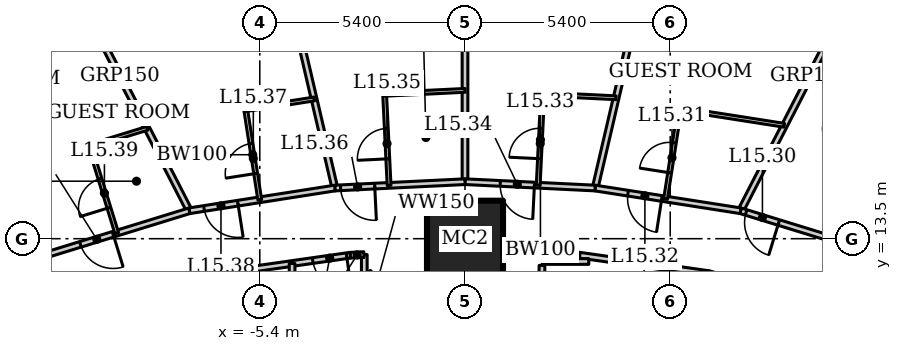
"""IFC4 building model, lengths in metres.
Left out: names, types, materials, properties, quantities, classifications, styles, units other than length and angle.
Written with IfcOpenShell. Run it as: python <this file> out.ifc"""

import sys

from ifc_helpers import new_model, si_unit, direction, frame, frame_2d, origin, origin_2d, place, context, subcontext, project, spatial, rectangle, hollow_rectangle, extrude, element, fill, save


model = new_model("IFC4")
c1 = context("Model", 3, precision=1e-05, world=origin(), true_north=direction((0.0, 1.0)))
c2 = subcontext(c1, "Body", "Model", "MODEL_VIEW")
j1 = project(units=[si_unit("LENGTHUNIT", "METRE"), si_unit("PLANEANGLEUNIT", "RADIAN")], contexts=[c1])
p1 = place(None, origin())
s1 = spatial("IfcSite", under=j1, at=p1, CompositionType="ELEMENT")
p2 = place(p1, origin())
s2 = spatial("IfcBuilding", under=s1, at=p2, CompositionType="ELEMENT")
p3 = place(p2, frame((0.0, 0.0, 69.4)))
s3 = spatial("IfcBuildingStorey", under=s2, at=p3, CompositionType="ELEMENT", Elevation=69.4)
p4 = place(p3, frame((0.0, 13.5, 0.0), z_axis=(0.0, 0.0, 1.0), x_axis=(1.0, 0.0, 0.0)))
e1 = element("IfcColumn", 1, at=p4, inside=s3, PredefinedType="COLUMN", context=c2, shape_type="SweptSolid", body=[
    extrude(hollow_rectangle(XDim=2.0, YDim=2.0, WallThickness=0.17, at=origin_2d()), origin(), (0.0, 0.0, 1.0), 3.6),
])
p5 = place(p3, frame((10.912, 21.346, 0.0), z_axis=(0.0, 0.0, 1.0), x_axis=(-0.45752665959, -0.889195904042, 0.0)))
e2 = element("IfcWall", 2, at=p5, inside=s3, PredefinedType="PARTITIONING", context=c2, shape_type="SweptSolid", body=[
    extrude(rectangle(XDim=7.997, YDim=0.15, at=frame_2d((3.999, 0.0))), origin(), (0.0, 0.0, 1.0), 2.528),
])
p6 = place(p3, frame((5.211, 22.496, 0.0), z_axis=(0.0, 0.0, 1.0), x_axis=(-0.227056984461, -0.973881474209, 0.0)))
e3 = element("IfcWall", 3, at=p6, inside=s3, PredefinedType="PARTITIONING", context=c2, shape_type="SweptSolid", body=[
    extrude(rectangle(XDim=7.869, YDim=0.15, at=frame_2d((3.934, 0.0))), origin(), (0.0, 0.0, 1.0), 2.767),
])
p7 = place(p3, frame((0.0, 22.825, 0.0), z_axis=(0.0, 0.0, 1.0), x_axis=(0.0, -1.0, 0.0)))
e4 = element("IfcWall", 4, at=p7, inside=s3, PredefinedType="PARTITIONING", context=c2, shape_type="SweptSolid", body=[
    extrude(rectangle(XDim=7.825, YDim=0.15, at=frame_2d((3.912, 0.0))), origin(), (0.0, 0.0, 1.0), 2.924),
])
p8 = place(p3, frame((-5.211, 22.496, 0.0), z_axis=(0.0, 0.0, 1.0), x_axis=(0.227056984461, -0.973881474209, 0.0)))
e5 = element("IfcWall", 5, at=p8, inside=s3, PredefinedType="PARTITIONING", context=c2, shape_type="SweptSolid", body=[
    extrude(rectangle(XDim=7.869, YDim=0.15, at=frame_2d((3.934, 0.0))), origin(), (0.0, 0.0, 1.0), 2.767),
])
p9 = place(p3, frame((-10.912, 21.346, 0.0), z_axis=(0.0, 0.0, 1.0), x_axis=(0.45752665959, -0.889195904042, 0.0)))
e6 = element("IfcWall", 6, at=p9, inside=s3, PredefinedType="PARTITIONING", context=c2, shape_type="SweptSolid", body=[
    extrude(rectangle(XDim=7.997, YDim=0.15, at=frame_2d((3.999, 0.0))), origin(), (0.0, 0.0, 1.0), 2.528),
])
p10 = place(p3, frame((12.257, 12.693, 0.0), z_axis=(0.0, 0.0, 1.0), x_axis=(-0.955657956744, 0.294478980085, 0.0)))
e7 = element("IfcWall", 7, at=p10, inside=s3, PredefinedType="PARTITIONING", context=c2, shape_type="SweptSolid", body=[
    extrude(rectangle(XDim=5.236, YDim=0.15, at=frame_2d((2.618, 0.0))), origin(), (0.0, 0.0, 1.0), 3.45),
])
p11 = place(p10, frame((4.186, 0.0, 0.0)))
e8 = element("IfcOpeningElement", 8, at=p11, cuts=e7, PredefinedType="OPENING", context=c2, shape_type="SweptSolid", body=[
    extrude(rectangle(XDim=0.9, YDim=2.1, at=frame_2d((0.45, 1.05))), frame((0.0, 0.085, 0.0), z_axis=(0.0, -1.0, 0.0), x_axis=(1.0, 0.0, 0.0)), (0.0, 0.0, 1.0), 0.17),
])
p12 = place(p3, frame((7.253, 14.235, 0.0), z_axis=(0.0, 0.0, 1.0), x_axis=(-0.988015036573, 0.154357660987, 0.0)))
e9 = element("IfcWall", 9, at=p12, inside=s3, PredefinedType="PARTITIONING", context=c2, shape_type="SweptSolid", body=[
    extrude(rectangle(XDim=3.875, YDim=0.15, at=frame_2d((1.938, 0.0))), origin(), (0.0, 0.0, 1.0), 3.45),
])
p13 = place(p12, frame((2.1, 0.0, 0.0)))
e10 = element("IfcOpeningElement", 10, at=p13, cuts=e9, PredefinedType="OPENING", context=c2, shape_type="SweptSolid", body=[
    extrude(rectangle(XDim=0.9, YDim=2.1, at=frame_2d((0.45, 1.05))), frame((0.0, 0.085, 0.0), z_axis=(0.0, -1.0, 0.0), x_axis=(1.0, 0.0, 0.0)), (0.0, 0.0, 1.0), 0.17),
])
p14 = place(p3, frame((3.424, 14.833, 0.0), z_axis=(0.0, 0.0, 1.0), x_axis=(-0.998809560203, 0.048779733975, 0.0)))
e11 = element("IfcWall", 11, at=p14, inside=s3, PredefinedType="PARTITIONING", context=c2, shape_type="SweptSolid", body=[
    extrude(rectangle(XDim=3.428, YDim=0.15, at=frame_2d((1.714, 0.0))), origin(), (0.0, 0.0, 1.0), 3.45),
])
p15 = place(p14, frame((1.6, 0.0, 0.0)))
e12 = element("IfcOpeningElement", 12, at=p15, cuts=e11, PredefinedType="OPENING", context=c2, shape_type="SweptSolid", body=[
    extrude(rectangle(XDim=0.9, YDim=2.1, at=frame_2d((0.45, 1.05))), frame((0.0, 0.085, 0.0), z_axis=(0.0, -1.0, 0.0), x_axis=(1.0, 0.0, 0.0)), (0.0, 0.0, 1.0), 0.17),
])
p16 = place(p3, frame((0.0, 15.0, 0.0), z_axis=(0.0, 0.0, 1.0), x_axis=(-0.998809560203, -0.048779733975, 0.0)))
e13 = element("IfcWall", 13, at=p16, inside=s3, PredefinedType="PARTITIONING", context=c2, shape_type="SweptSolid", body=[
    extrude(rectangle(XDim=3.428, YDim=0.15, at=frame_2d((1.714, 0.0))), origin(), (0.0, 0.0, 1.0), 3.45),
])
p17 = place(p16, frame((2.378, 0.0, 0.0)))
e14 = element("IfcOpeningElement", 14, at=p17, cuts=e13, PredefinedType="OPENING", context=c2, shape_type="SweptSolid", body=[
    extrude(rectangle(XDim=0.9, YDim=2.1, at=frame_2d((0.45, 1.05))), frame((0.0, 0.085, 0.0), z_axis=(0.0, -1.0, 0.0), x_axis=(1.0, 0.0, 0.0)), (0.0, 0.0, 1.0), 0.17),
])
p18 = place(p3, frame((-3.424, 14.833, 0.0), z_axis=(0.0, 0.0, 1.0), x_axis=(-0.988015036573, -0.154357660987, 0.0)))
e15 = element("IfcWall", 15, at=p18, inside=s3, PredefinedType="PARTITIONING", context=c2, shape_type="SweptSolid", body=[
    extrude(rectangle(XDim=3.875, YDim=0.15, at=frame_2d((1.938, 0.0))), origin(), (0.0, 0.0, 1.0), 3.45),
])
p19 = place(p18, frame((2.583, 0.0, 0.0)))
e16 = element("IfcOpeningElement", 16, at=p19, cuts=e15, PredefinedType="OPENING", context=c2, shape_type="SweptSolid", body=[
    extrude(rectangle(XDim=0.9, YDim=2.1, at=frame_2d((0.45, 1.05))), frame((0.0, 0.085, 0.0), z_axis=(0.0, -1.0, 0.0), x_axis=(1.0, 0.0, 0.0)), (0.0, 0.0, 1.0), 0.17),
])
p20 = place(p3, frame((-7.253, 14.235, 0.0), z_axis=(0.0, 0.0, 1.0), x_axis=(-0.955657956744, -0.294478980085, 0.0)))
e17 = element("IfcWall", 17, at=p20, inside=s3, PredefinedType="PARTITIONING", context=c2, shape_type="SweptSolid", body=[
    extrude(rectangle(XDim=5.236, YDim=0.15, at=frame_2d((2.618, 0.0))), origin(), (0.0, 0.0, 1.0), 3.45),
])
p21 = place(p20, frame((2.1, 0.0, 0.0)))
e18 = element("IfcOpeningElement", 18, at=p21, cuts=e17, PredefinedType="OPENING", context=c2, shape_type="SweptSolid", body=[
    extrude(rectangle(XDim=0.9, YDim=2.1, at=frame_2d((0.45, 1.05))), frame((0.0, 0.085, 0.0), z_axis=(0.0, -1.0, 0.0), x_axis=(1.0, 0.0, 0.0)), (0.0, 0.0, 1.0), 0.17),
])
p22 = place(p3, frame((10.924, 11.312, 0.0), z_axis=(0.0, 0.0, 1.0), x_axis=(-0.962643729928, 0.270771211967, 0.0)))
e19 = element("IfcWall", 19, at=p22, inside=s3, PredefinedType="PARTITIONING", context=c2, shape_type="SweptSolid", body=[
    extrude(rectangle(XDim=4.688, YDim=0.15, at=frame_2d((2.344, 0.0))), origin(), (0.0, 0.0, 1.0), 3.45),
])
p23 = place(p22, frame((1.894, 0.0, 0.0)))
e20 = element("IfcOpeningElement", 20, at=p23, cuts=e19, PredefinedType="OPENING", context=c2, shape_type="SweptSolid", body=[
    extrude(rectangle(XDim=0.9, YDim=2.1, at=frame_2d((0.45, 1.05))), frame((0.0, 0.085, 0.0), z_axis=(0.0, -1.0, 0.0), x_axis=(1.0, 0.0, 0.0)), (0.0, 0.0, 1.0), 0.17),
])
p24 = place(p3, frame((6.411, 12.582, 0.0), z_axis=(0.0, 0.0, 1.0), x_axis=(-0.990002114939, 0.14105251652, 0.0)))
e21 = element("IfcWall", 21, at=p24, inside=s3, PredefinedType="PARTITIONING", context=c2, shape_type="SweptSolid", body=[
    extrude(rectangle(XDim=3.429, YDim=0.15, at=frame_2d((1.714, 0.0))), origin(), (0.0, 0.0, 1.0), 3.45),
])
p25 = place(p3, frame((-3.016, 13.066, 0.0), z_axis=(0.0, 0.0, 1.0), x_axis=(-0.990002114939, -0.14105251652, 0.0)))
e22 = element("IfcWall", 22, at=p25, inside=s3, PredefinedType="PARTITIONING", context=c2, shape_type="SweptSolid", body=[
    extrude(rectangle(XDim=3.429, YDim=0.15, at=frame_2d((1.714, 0.0))), origin(), (0.0, 0.0, 1.0), 3.45),
])
p26 = place(p25, frame((0.1, 0.0, 0.0)))
e23 = element("IfcOpeningElement", 23, at=p26, cuts=e22, PredefinedType="OPENING", context=c2, shape_type="SweptSolid", body=[
    extrude(rectangle(XDim=0.9, YDim=2.1, at=frame_2d((0.45, 1.05))), frame((0.0, 0.085, 0.0), z_axis=(0.0, -1.0, 0.0), x_axis=(1.0, 0.0, 0.0)), (0.0, 0.0, 1.0), 0.17),
])
p27 = place(p3, frame((-6.411, 12.582, 0.0), z_axis=(0.0, 0.0, 1.0), x_axis=(-0.962643729928, -0.270771211967, 0.0)))
e24 = element("IfcWall", 24, at=p27, inside=s3, PredefinedType="PARTITIONING", context=c2, shape_type="SweptSolid", body=[
    extrude(rectangle(XDim=4.688, YDim=0.15, at=frame_2d((2.344, 0.0))), origin(), (0.0, 0.0, 1.0), 3.45),
])
p28 = place(p27, frame((1.894, 0.0, 0.0)))
e25 = element("IfcOpeningElement", 25, at=p28, cuts=e24, PredefinedType="OPENING", context=c2, shape_type="SweptSolid", body=[
    extrude(rectangle(XDim=0.9, YDim=2.1, at=frame_2d((0.45, 1.05))), frame((0.0, 0.085, 0.0), z_axis=(0.0, -1.0, 0.0), x_axis=(1.0, 0.0, 0.0)), (0.0, 0.0, 1.0), 0.17),
])
p29 = place(p3, frame((-2.65, 9.2, 0.0), z_axis=(0.0, 0.0, 1.0), x_axis=(0.0, 1.0, 0.0)))
e26 = element("IfcWall", 26, at=p29, inside=s3, PredefinedType="SOLIDWALL", context=c2, shape_type="SweptSolid", body=[
    extrude(rectangle(XDim=3.882, YDim=0.15, at=frame_2d((1.941, 0.0))), origin(), (0.0, 0.0, 1.0), 2.767),
])
p30 = place(p3, frame((-4.55, 9.2, 0.0), z_axis=(0.0, 0.0, 1.0), x_axis=(0.0, 1.0, 0.0)))
e27 = element("IfcWall", 27, at=p30, inside=s3, PredefinedType="SOLIDWALL", context=c2, shape_type="SweptSolid", body=[
    extrude(rectangle(XDim=3.647, YDim=0.15, at=frame_2d((1.824, 0.0))), origin(), (0.0, 0.0, 1.0), 3.45),
])
p31 = place(p3, frame((5.277, 14.543, 0.0), z_axis=(0.0, 0.0, 1.0), x_axis=(0.154426532979, 0.988004274238, 0.0)))
e28 = element("IfcWall", 28, at=p31, inside=s3, PredefinedType="PARTITIONING", context=c2, shape_type="SweptSolid", body=[
    extrude(rectangle(XDim=2.4, YDim=0.1, at=frame_2d((1.2, 0.0))), origin(), (0.0, 0.0, 1.0), 3.45),
])
p32 = place(p31, frame((0.7, 0.0, 0.0)))
e29 = element("IfcOpeningElement", 29, at=p32, cuts=e28, PredefinedType="OPENING", context=c2, shape_type="SweptSolid", body=[
    extrude(rectangle(XDim=0.8, YDim=2.1, at=frame_2d((0.4, 1.05))), frame((0.0, 0.06, 0.0), z_axis=(0.0, -1.0, 0.0), x_axis=(1.0, 0.0, 0.0)), (0.0, 0.0, 1.0), 0.12),
])
p33 = place(p3, frame((5.647, 16.915, 0.0), z_axis=(0.0, 0.0, 1.0), x_axis=(0.988015375833, -0.154355489429, 0.0)))
e30 = element("IfcWall", 30, at=p33, inside=s3, PredefinedType="PARTITIONING", context=c2, shape_type="SweptSolid", body=[
    extrude(rectangle(XDim=2.785, YDim=0.1, at=frame_2d((1.393, 0.0))), origin(), (0.0, 0.0, 1.0), 3.45),
])
p34 = place(p3, frame((1.926, 14.906, 0.0), z_axis=(0.0, 0.0, 1.0), x_axis=(0.048725028858, 0.998812230383, 0.0)))
e31 = element("IfcWall", 31, at=p34, inside=s3, PredefinedType="PARTITIONING", context=c2, shape_type="SweptSolid", body=[
    extrude(rectangle(XDim=2.4, YDim=0.1, at=frame_2d((1.2, 0.0))), origin(), (0.0, 0.0, 1.0), 2.749),
])
p35 = place(p34, frame((0.7, 0.0, 0.0)))
e32 = element("IfcOpeningElement", 32, at=p35, cuts=e31, PredefinedType="OPENING", context=c2, shape_type="SweptSolid", body=[
    extrude(rectangle(XDim=0.8, YDim=2.1, at=frame_2d((0.4, 1.05))), frame((0.0, 0.06, 0.0), z_axis=(0.0, -1.0, 0.0), x_axis=(1.0, 0.0, 0.0)), (0.0, 0.0, 1.0), 0.12),
])
p36 = place(p3, frame((2.043, 17.303, 0.0), z_axis=(0.0, 0.0, 1.0), x_axis=(0.998809649749, -0.048777900405, 0.0)))
e33 = element("IfcWall", 33, at=p36, inside=s3, PredefinedType="PARTITIONING", context=c2, shape_type="SweptSolid", body=[
    extrude(rectangle(XDim=1.932, YDim=0.1, at=frame_2d((0.966, 0.0))), origin(), (0.0, 0.0, 1.0), 3.45),
])
p37 = place(p3, frame((-1.998, 14.903, 0.0), z_axis=(0.0, 0.0, 1.0), x_axis=(-0.048831470304, 0.998807032168, 0.0)))
e34 = element("IfcWall", 34, at=p37, inside=s3, PredefinedType="PARTITIONING", context=c2, shape_type="SweptSolid", body=[
    extrude(rectangle(XDim=2.4, YDim=0.1, at=frame_2d((1.2, 0.0))), origin(), (0.0, 0.0, 1.0), 2.749),
])
p38 = place(p37, frame((0.7, 0.0, 0.0)))
e35 = element("IfcOpeningElement", 35, at=p38, cuts=e34, PredefinedType="OPENING", context=c2, shape_type="SweptSolid", body=[
    extrude(rectangle(XDim=0.8, YDim=2.1, at=frame_2d((0.4, 1.05))), frame((0.0, 0.06, 0.0), z_axis=(0.0, -1.0, 0.0), x_axis=(1.0, 0.0, 0.0)), (0.0, 0.0, 1.0), 0.12),
])
p39 = place(p3, frame((-2.115, 17.3, 0.0), z_axis=(0.0, 0.0, 1.0), x_axis=(0.998809749254, 0.048775862842, 0.0)))
e36 = element("IfcWall", 36, at=p39, inside=s3, PredefinedType="PARTITIONING", context=c2, shape_type="SweptSolid", body=[
    extrude(rectangle(XDim=2.117, YDim=0.1, at=frame_2d((1.059, 0.0))), origin(), (0.0, 0.0, 1.0), 3.45),
])
p40 = place(p3, frame((-5.4, 14.524, 0.0), z_axis=(0.0, 0.0, 1.0), x_axis=(-0.154426532979, 0.988004274238, 0.0)))
e37 = element("IfcWall", 37, at=p40, inside=s3, PredefinedType="PARTITIONING", context=c2, shape_type="SweptSolid", body=[
    extrude(rectangle(XDim=2.4, YDim=0.1, at=frame_2d((1.2, 0.0))), origin(), (0.0, 0.0, 1.0), 3.45),
])
p41 = place(p40, frame((0.7, 0.0, 0.0)))
e38 = element("IfcOpeningElement", 38, at=p41, cuts=e37, PredefinedType="OPENING", context=c2, shape_type="SweptSolid", body=[
    extrude(rectangle(XDim=0.8, YDim=2.1, at=frame_2d((0.4, 1.05))), frame((0.0, 0.06, 0.0), z_axis=(0.0, -1.0, 0.0), x_axis=(1.0, 0.0, 0.0)), (0.0, 0.0, 1.0), 0.12),
])
p42 = place(p3, frame((-5.771, 16.895, 0.0), z_axis=(0.0, 0.0, 1.0), x_axis=(0.98801840204, 0.154336117711, 0.0)))
e39 = element("IfcWall", 39, at=p42, inside=s3, PredefinedType="PARTITIONING", context=c2, shape_type="SweptSolid", body=[
    extrude(rectangle(XDim=1.827, YDim=0.1, at=frame_2d((0.914, 0.0))), origin(), (0.0, 0.0, 1.0), 3.45),
])
p43 = place(p3, frame((-9.164, 13.646, 0.0), z_axis=(0.0, 0.0, 1.0), x_axis=(-0.294507586191, 0.955649141514, 0.0)))
e40 = element("IfcWall", 40, at=p43, inside=s3, PredefinedType="PARTITIONING", context=c2, shape_type="SweptSolid", body=[
    extrude(rectangle(XDim=2.4, YDim=0.1, at=frame_2d((1.2, 0.0))), origin(), (0.0, 0.0, 1.0), 3.45),
])
p44 = place(p43, frame((0.7, 0.0, 0.0)))
e41 = element("IfcOpeningElement", 41, at=p44, cuts=e40, PredefinedType="OPENING", context=c2, shape_type="SweptSolid", body=[
    extrude(rectangle(XDim=0.8, YDim=2.1, at=frame_2d((0.4, 1.05))), frame((0.0, 0.06, 0.0), z_axis=(0.0, -1.0, 0.0), x_axis=(1.0, 0.0, 0.0)), (0.0, 0.0, 1.0), 0.12),
])
p45 = place(p3, frame((-9.871, 15.939, 0.0), z_axis=(0.0, 0.0, 1.0), x_axis=(0.955642133669, 0.29453032502, 0.0)))
e42 = element("IfcWall", 42, at=p45, inside=s3, PredefinedType="PARTITIONING", context=c2, shape_type="SweptSolid", body=[
    extrude(rectangle(XDim=1.583, YDim=0.1, at=frame_2d((0.791, 0.0))), origin(), (0.0, 0.0, 1.0), 3.45),
])
p46 = place(p3, frame((3.016, 13.066, 0.0), z_axis=(0.0, 0.0, 1.0), x_axis=(-0.999010128674, 0.044483286824, 0.0)))
e43 = element("IfcWall", 43, at=p46, inside=s3, PredefinedType="PARTITIONING", context=c2, shape_type="SweptSolid", body=[
    extrude(rectangle(XDim=0.982, YDim=0.15, at=frame_2d((0.491, 0.0))), origin(), (0.0, 0.0, 1.0), 3.45),
])
p47 = place(p3, frame((-2.66, 13.082, 0.0), z_axis=(0.0, 0.0, 1.0), x_axis=(-0.999010431215, -0.044476491801, 0.0)))
e44 = element("IfcWall", 44, at=p47, inside=s3, PredefinedType="PARTITIONING", context=c2, shape_type="SweptSolid", body=[
    extrude(rectangle(XDim=0.357, YDim=0.15, at=frame_2d((0.178, 0.0))), origin(), (0.0, 0.0, 1.0), 3.45),
])
p48 = place(p3, frame((3.258, 12.9, 0.0), z_axis=(0.0, 0.0, 1.0), x_axis=(-1.0, 0.0, 0.0)))
e45 = element("IfcWall", 45, at=p48, inside=s3, PredefinedType="PARTITIONING", context=c2, shape_type="SweptSolid", body=[
    extrude(rectangle(XDim=1.223, YDim=0.15, at=frame_2d((0.611, 0.0))), origin(), (0.0, 0.0, 1.0), 3.45),
])
p49 = place(p3, frame((2.025, 12.797, 0.0), z_axis=(0.0, 0.0, 1.0), x_axis=(0.0, -1.0, 0.0)))
e46 = element("IfcWall", 46, at=p49, inside=s3, PredefinedType="PARTITIONING", context=c2, shape_type="SweptSolid", body=[
    extrude(rectangle(XDim=0.721, YDim=0.15, at=frame_2d((0.361, 0.0))), origin(), (0.0, 0.0, 1.0), 2.749),
])
p50 = place(p3, frame((-1.425, 11.475, 0.0), z_axis=(0.0, 0.0, 1.0), x_axis=(-0.701810897552, 0.71236329501, 0.0)))
e47 = element("IfcWall", 47, at=p50, inside=s3, PredefinedType="PARTITIONING", context=c2, shape_type="SweptSolid", body=[
    extrude(rectangle(XDim=1.596, YDim=0.15, at=frame_2d((0.798, 0.0))), origin(), (0.0, 0.0, 1.0), 3.45),
])
p51 = place(p50, frame((0.45, 0.0, 0.0)))
e48 = element("IfcOpeningElement", 48, at=p51, cuts=e47, PredefinedType="OPENING", context=c2, shape_type="SweptSolid", body=[
    extrude(rectangle(XDim=1.0, YDim=2.1, at=frame_2d((0.5, 1.05))), frame((0.0, 0.085, 0.0), z_axis=(0.0, -1.0, 0.0), x_axis=(1.0, 0.0, 0.0)), (0.0, 0.0, 1.0), 0.17),
])
p52 = place(p26, origin())
e49 = element("IfcDoor", 49, at=p52, inside=s3, OperationType="SINGLE_SWING_LEFT", PredefinedType="DOOR", context=c2, shape_type="SweptSolid", body=[
    extrude(rectangle(XDim=0.9, YDim=2.1, at=frame_2d((0.45, 1.05))), frame((0.0, 0.025, 0.0), z_axis=(0.0, -1.0, 0.0), x_axis=(1.0, 0.0, 0.0)), (0.0, 0.0, 1.0), 0.05),
])
fill(e23, e49)
p53 = place(p11, origin())
e50 = element("IfcDoor", 50, at=p53, inside=s3, OperationType="SINGLE_SWING_LEFT", PredefinedType="DOOR", context=c2, shape_type="SweptSolid", body=[
    extrude(rectangle(XDim=0.9, YDim=2.1, at=frame_2d((0.45, 1.05))), frame((0.0, 0.025, 0.0), z_axis=(0.0, -1.0, 0.0), x_axis=(1.0, 0.0, 0.0)), (0.0, 0.0, 1.0), 0.05),
])
fill(e8, e50)
p54 = place(p32, origin())
e51 = element("IfcDoor", 51, at=p54, inside=s3, OperationType="SINGLE_SWING_LEFT", PredefinedType="DOOR", context=c2, shape_type="SweptSolid", body=[
    extrude(rectangle(XDim=0.8, YDim=2.1, at=frame_2d((0.4, 1.05))), frame((0.0, 0.025, 0.0), z_axis=(0.0, -1.0, 0.0), x_axis=(1.0, 0.0, 0.0)), (0.0, 0.0, 1.0), 0.05),
])
fill(e29, e51)
p55 = place(p13, origin())
e52 = element("IfcDoor", 52, at=p55, inside=s3, OperationType="SINGLE_SWING_LEFT", PredefinedType="DOOR", context=c2, shape_type="SweptSolid", body=[
    extrude(rectangle(XDim=0.9, YDim=2.1, at=frame_2d((0.45, 1.05))), frame((0.0, 0.025, 0.0), z_axis=(0.0, -1.0, 0.0), x_axis=(1.0, 0.0, 0.0)), (0.0, 0.0, 1.0), 0.05),
])
fill(e10, e52)
p56 = place(p35, origin())
e53 = element("IfcDoor", 53, at=p56, inside=s3, OperationType="SINGLE_SWING_LEFT", PredefinedType="DOOR", context=c2, shape_type="SweptSolid", body=[
    extrude(rectangle(XDim=0.8, YDim=2.1, at=frame_2d((0.4, 1.05))), frame((0.0, 0.025, 0.0), z_axis=(0.0, -1.0, 0.0), x_axis=(1.0, 0.0, 0.0)), (0.0, 0.0, 1.0), 0.05),
])
fill(e32, e53)
p57 = place(p15, origin())
e54 = element("IfcDoor", 54, at=p57, inside=s3, OperationType="SINGLE_SWING_LEFT", PredefinedType="DOOR", context=c2, shape_type="SweptSolid", body=[
    extrude(rectangle(XDim=0.9, YDim=2.1, at=frame_2d((0.45, 1.05))), frame((0.0, 0.025, 0.0), z_axis=(0.0, -1.0, 0.0), x_axis=(1.0, 0.0, 0.0)), (0.0, 0.0, 1.0), 0.05),
])
fill(e12, e54)
p58 = place(p38, origin())
e55 = element("IfcDoor", 55, at=p58, inside=s3, OperationType="SINGLE_SWING_LEFT", PredefinedType="DOOR", context=c2, shape_type="SweptSolid", body=[
    extrude(rectangle(XDim=0.8, YDim=2.1, at=frame_2d((0.4, 1.05))), frame((0.0, 0.025, 0.0), z_axis=(0.0, -1.0, 0.0), x_axis=(1.0, 0.0, 0.0)), (0.0, 0.0, 1.0), 0.05),
])
fill(e35, e55)
p59 = place(p17, origin())
e56 = element("IfcDoor", 56, at=p59, inside=s3, OperationType="SINGLE_SWING_LEFT", PredefinedType="DOOR", context=c2, shape_type="SweptSolid", body=[
    extrude(rectangle(XDim=0.9, YDim=2.1, at=frame_2d((0.45, 1.05))), frame((0.0, 0.025, 0.0), z_axis=(0.0, -1.0, 0.0), x_axis=(1.0, 0.0, 0.0)), (0.0, 0.0, 1.0), 0.05),
])
fill(e14, e56)
p60 = place(p41, origin())
e57 = element("IfcDoor", 57, at=p60, inside=s3, OperationType="SINGLE_SWING_LEFT", PredefinedType="DOOR", context=c2, shape_type="SweptSolid", body=[
    extrude(rectangle(XDim=0.8, YDim=2.1, at=frame_2d((0.4, 1.05))), frame((0.0, 0.025, 0.0), z_axis=(0.0, -1.0, 0.0), x_axis=(1.0, 0.0, 0.0)), (0.0, 0.0, 1.0), 0.05),
])
fill(e38, e57)
p61 = place(p19, origin())
e58 = element("IfcDoor", 58, at=p61, inside=s3, OperationType="SINGLE_SWING_LEFT", PredefinedType="DOOR", context=c2, shape_type="SweptSolid", body=[
    extrude(rectangle(XDim=0.9, YDim=2.1, at=frame_2d((0.45, 1.05))), frame((0.0, 0.025, 0.0), z_axis=(0.0, -1.0, 0.0), x_axis=(1.0, 0.0, 0.0)), (0.0, 0.0, 1.0), 0.05),
])
fill(e16, e58)
p62 = place(p44, origin())
e59 = element("IfcDoor", 59, at=p62, inside=s3, OperationType="SINGLE_SWING_LEFT", PredefinedType="DOOR", context=c2, shape_type="SweptSolid", body=[
    extrude(rectangle(XDim=0.8, YDim=2.1, at=frame_2d((0.4, 1.05))), frame((0.0, 0.025, 0.0), z_axis=(0.0, -1.0, 0.0), x_axis=(1.0, 0.0, 0.0)), (0.0, 0.0, 1.0), 0.05),
])
fill(e41, e59)
p63 = place(p21, origin())
e60 = element("IfcDoor", 60, at=p63, inside=s3, OperationType="SINGLE_SWING_LEFT", PredefinedType="DOOR", context=c2, shape_type="SweptSolid", body=[
    extrude(rectangle(XDim=0.9, YDim=2.1, at=frame_2d((0.45, 1.05))), frame((0.0, 0.025, 0.0), z_axis=(0.0, -1.0, 0.0), x_axis=(1.0, 0.0, 0.0)), (0.0, 0.0, 1.0), 0.05),
])
fill(e18, e60)
save(model, sys.argv[1])
